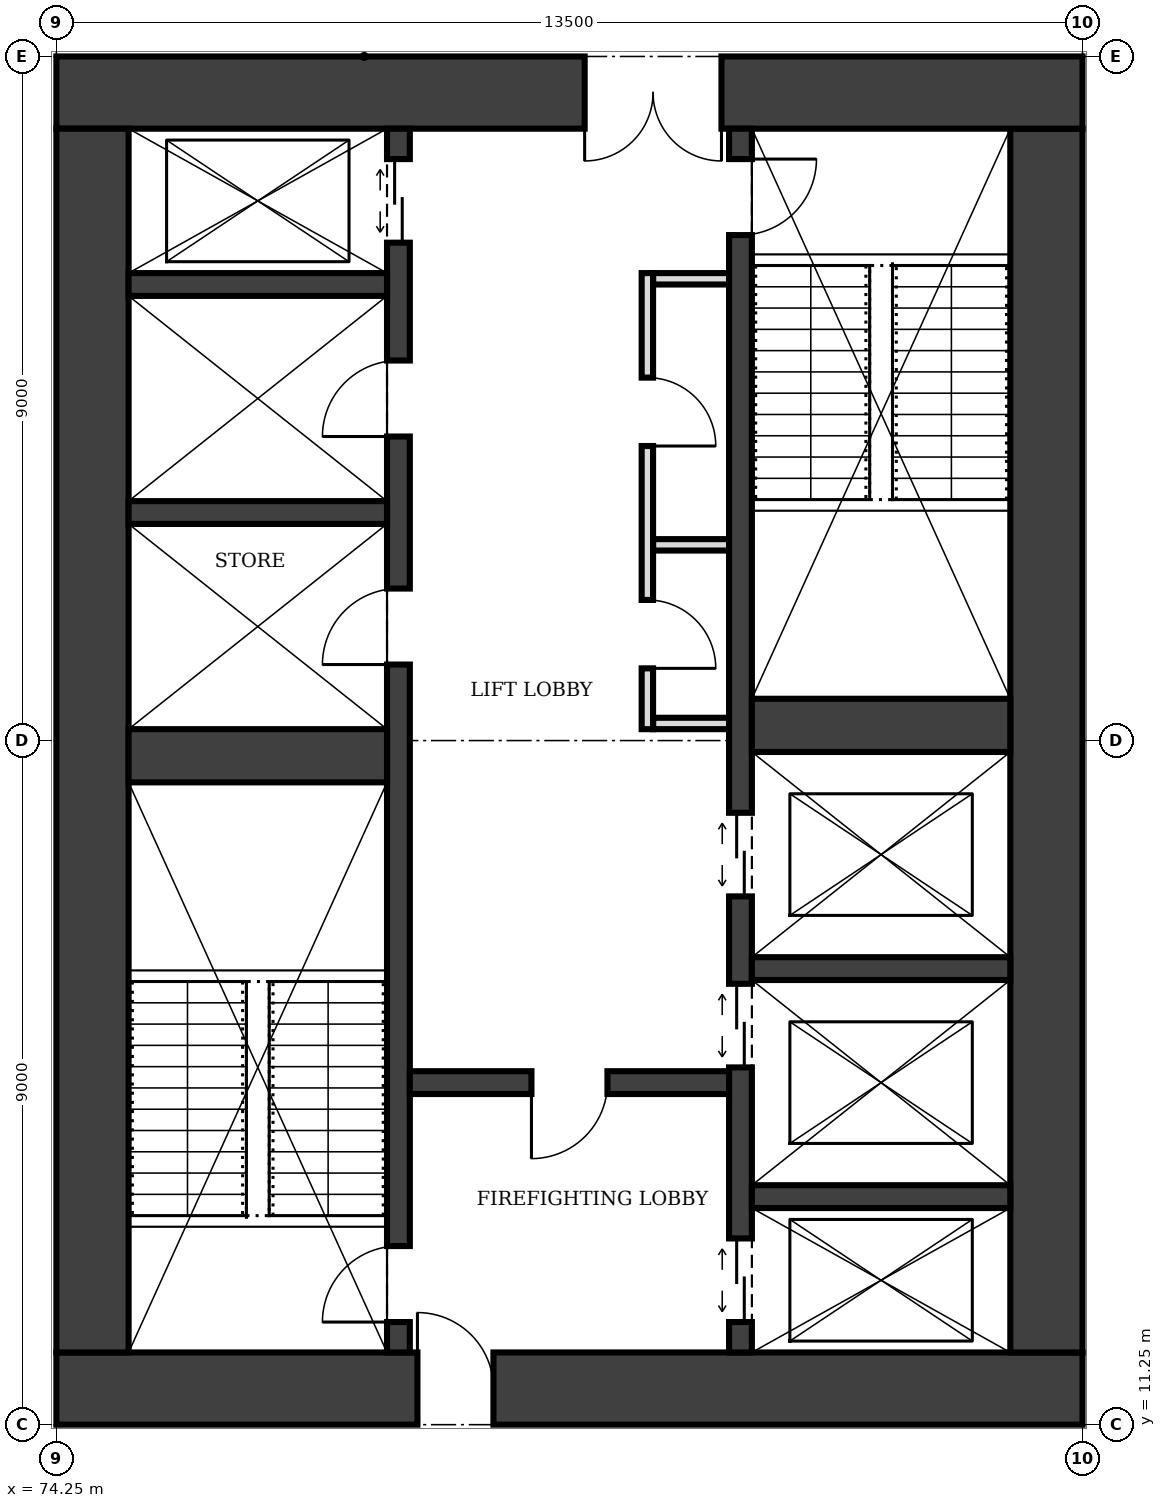
"""IFC4 building model, lengths in metres.
Left out: names, types, materials, properties, quantities, classifications, styles, units other than length and angle.
Written with IfcOpenShell. Run it as: python <this file> out.ifc"""

import sys

from ifc_helpers import new_model, si_unit, direction, frame, frame_2d, origin, place, context, subcontext, project, spatial, rectangle, extrude, element, fill, save


model = new_model("IFC4")
c1 = context("Model", 3, precision=1e-05, world=origin(), true_north=direction((0.0, 1.0)))
c2 = subcontext(c1, "Body", "Model", "MODEL_VIEW")
j1 = project(units=[si_unit("LENGTHUNIT", "METRE"), si_unit("PLANEANGLEUNIT", "RADIAN")], contexts=[c1])
p1 = place(None, origin())
s1 = spatial("IfcSite", under=j1, at=p1, CompositionType="ELEMENT")
p2 = place(p1, origin())
s2 = spatial("IfcBuilding", under=s1, at=p2, CompositionType="ELEMENT")
p3 = place(p2, frame((0.0, 0.0, 185.0)))
s3 = spatial("IfcBuildingStorey", under=s2, at=p3, CompositionType="ELEMENT", Elevation=185.0)
p4 = place(p3, frame((74.25, 11.725, 0.0), z_axis=(0.0, 0.0, 1.0), x_axis=(1.0, 0.0, 0.0)))
e1 = element("IfcWall", 1, at=p4, inside=s3, PredefinedType="SHEAR", context=c2, shape_type="SweptSolid", body=[
    extrude(rectangle(XDim=13.5, YDim=0.95, at=frame_2d((6.75, 0.0))), origin(), (0.0, 0.0, 1.0), 4.0),
])
p5 = place(p4, frame((4.75, 0.0, 0.0)))
e2 = element("IfcOpeningElement", 2, at=p5, cuts=e1, PredefinedType="OPENING", context=c2, shape_type="SweptSolid", body=[
    extrude(rectangle(XDim=1.0, YDim=2.1, at=frame_2d((0.5, 1.05))), frame((0.0, 0.485, 0.0), z_axis=(0.0, -1.0, 0.0), x_axis=(1.0, 0.0, 0.0)), (0.0, 0.0, 1.0), 0.97),
])
p6 = place(p3, frame((87.275, 12.2, 0.0), z_axis=(0.0, 0.0, 1.0), x_axis=(0.0, 1.0, 0.0)))
e3 = element("IfcWall", 3, at=p6, inside=s3, PredefinedType="SHEAR", context=c2, shape_type="SweptSolid", body=[
    extrude(rectangle(XDim=16.1, YDim=0.95, at=frame_2d((8.05, 0.0))), origin(), (0.0, 0.0, 1.0), 4.0),
])
p7 = place(p3, frame((87.75, 28.775, 0.0), z_axis=(0.0, 0.0, 1.0), x_axis=(-1.0, 0.0, 0.0)))
e4 = element("IfcWall", 4, at=p7, inside=s3, PredefinedType="SHEAR", context=c2, shape_type="SweptSolid", body=[
    extrude(rectangle(XDim=13.5, YDim=0.95, at=frame_2d((6.75, 0.0))), origin(), (0.0, 0.0, 1.0), 4.0),
])
p8 = place(p7, frame((4.75, 0.0, 0.0)))
e5 = element("IfcOpeningElement", 5, at=p8, cuts=e4, PredefinedType="OPENING", context=c2, shape_type="SweptSolid", body=[
    extrude(rectangle(XDim=1.8, YDim=2.1, at=frame_2d((0.9, 1.05))), frame((0.0, 0.485, 0.0), z_axis=(0.0, -1.0, 0.0), x_axis=(1.0, 0.0, 0.0)), (0.0, 0.0, 1.0), 0.97),
])
p9 = place(p3, frame((74.725, 28.3, 0.0), z_axis=(0.0, 0.0, 1.0), x_axis=(0.0, -1.0, 0.0)))
e6 = element("IfcWall", 6, at=p9, inside=s3, PredefinedType="SHEAR", context=c2, shape_type="SweptSolid", body=[
    extrude(rectangle(XDim=16.1, YDim=0.95, at=frame_2d((8.05, 0.0))), origin(), (0.0, 0.0, 1.0), 4.0),
])
p10 = place(p3, frame((78.75, 12.2, 0.0), z_axis=(0.0, 0.0, 1.0), x_axis=(0.0, 1.0, 0.0)))
e7 = element("IfcWall", 7, at=p10, inside=s3, PredefinedType="SHEAR", context=c2, shape_type="SweptSolid", body=[
    extrude(rectangle(XDim=16.1, YDim=0.3, at=frame_2d((8.05, 0.0))), origin(), (0.0, 0.0, 1.0), 4.0),
])
p11 = place(p10, frame((0.4, 0.0, 0.0)))
e8 = element("IfcOpeningElement", 8, at=p11, cuts=e7, PredefinedType="OPENING", context=c2, shape_type="SweptSolid", body=[
    extrude(rectangle(XDim=1.0, YDim=2.1, at=frame_2d((0.5, 1.05))), frame((0.0, 0.16, 0.0), z_axis=(0.0, -1.0, 0.0), x_axis=(1.0, 0.0, 0.0)), (0.0, 0.0, 1.0), 0.32),
])
p12 = place(p10, frame((14.6, 0.0, 0.0)))
e9 = element("IfcOpeningElement", 9, at=p12, cuts=e7, PredefinedType="OPENING", context=c2, shape_type="SweptSolid", body=[
    extrude(rectangle(XDim=1.1, YDim=2.1, at=frame_2d((0.55, 1.05))), frame((0.0, 0.16, 0.0), z_axis=(0.0, -1.0, 0.0), x_axis=(1.0, 0.0, 0.0)), (0.0, 0.0, 1.0), 0.32),
])
p13 = place(p10, frame((9.05, 0.0, 0.0)))
e10 = element("IfcOpeningElement", 10, at=p13, cuts=e7, PredefinedType="OPENING", context=c2, shape_type="SweptSolid", body=[
    extrude(rectangle(XDim=1.0, YDim=2.1, at=frame_2d((0.5, 1.05))), frame((0.0, 0.16, 0.0), z_axis=(0.0, -1.0, 0.0), x_axis=(1.0, 0.0, 0.0)), (0.0, 0.0, 1.0), 0.32),
])
p14 = place(p10, frame((12.05, 0.0, 0.0)))
e11 = element("IfcOpeningElement", 11, at=p14, cuts=e7, PredefinedType="OPENING", context=c2, shape_type="SweptSolid", body=[
    extrude(rectangle(XDim=1.0, YDim=2.1, at=frame_2d((0.5, 1.05))), frame((0.0, 0.16, 0.0), z_axis=(0.0, -1.0, 0.0), x_axis=(1.0, 0.0, 0.0)), (0.0, 0.0, 1.0), 0.32),
])
p15 = place(p3, frame((83.25, 12.2, 0.0), z_axis=(0.0, 0.0, 1.0), x_axis=(0.0, 1.0, 0.0)))
e12 = element("IfcWall", 12, at=p15, inside=s3, PredefinedType="SHEAR", context=c2, shape_type="SweptSolid", body=[
    extrude(rectangle(XDim=16.1, YDim=0.3, at=frame_2d((8.05, 0.0))), origin(), (0.0, 0.0, 1.0), 4.0),
])
p16 = place(p15, frame((14.7, 0.0, 0.0)))
e13 = element("IfcOpeningElement", 13, at=p16, cuts=e12, PredefinedType="OPENING", context=c2, shape_type="SweptSolid", body=[
    extrude(rectangle(XDim=1.0, YDim=2.1, at=frame_2d((0.5, 1.05))), frame((0.0, 0.16, 0.0), z_axis=(0.0, -1.0, 0.0), x_axis=(1.0, 0.0, 0.0)), (0.0, 0.0, 1.0), 0.32),
])
p17 = place(p15, frame((0.4, 0.0, 0.0)))
e14 = element("IfcOpeningElement", 14, at=p17, cuts=e12, PredefinedType="OPENING", context=c2, shape_type="SweptSolid", body=[
    extrude(rectangle(XDim=1.1, YDim=2.1, at=frame_2d((0.55, 1.05))), frame((0.0, 0.16, 0.0), z_axis=(0.0, -1.0, 0.0), x_axis=(1.0, 0.0, 0.0)), (0.0, 0.0, 1.0), 0.32),
])
p18 = place(p15, frame((3.75, 0.0, 0.0)))
e15 = element("IfcOpeningElement", 15, at=p18, cuts=e12, PredefinedType="OPENING", context=c2, shape_type="SweptSolid", body=[
    extrude(rectangle(XDim=1.1, YDim=2.1, at=frame_2d((0.55, 1.05))), frame((0.0, 0.16, 0.0), z_axis=(0.0, -1.0, 0.0), x_axis=(1.0, 0.0, 0.0)), (0.0, 0.0, 1.0), 0.32),
])
p19 = place(p15, frame((6.0, 0.0, 0.0)))
e16 = element("IfcOpeningElement", 16, at=p19, cuts=e12, PredefinedType="OPENING", context=c2, shape_type="SweptSolid", body=[
    extrude(rectangle(XDim=1.1, YDim=2.1, at=frame_2d((0.55, 1.05))), frame((0.0, 0.16, 0.0), z_axis=(0.0, -1.0, 0.0), x_axis=(1.0, 0.0, 0.0)), (0.0, 0.0, 1.0), 0.32),
])
p20 = place(p3, frame((75.2, 20.05, 0.0), z_axis=(0.0, 0.0, 1.0), x_axis=(1.0, 0.0, 0.0)))
e17 = element("IfcWall", 17, at=p20, inside=s3, PredefinedType="SHEAR", context=c2, shape_type="SweptSolid", body=[
    extrude(rectangle(XDim=3.4, YDim=0.7, at=frame_2d((1.7, 0.0))), origin(), (0.0, 0.0, 1.0), 4.0),
])
p21 = place(p3, frame((78.9, 15.75, 0.0), z_axis=(0.0, 0.0, 1.0), x_axis=(1.0, 0.0, 0.0)))
e18 = element("IfcWall", 18, at=p21, inside=s3, PredefinedType="SHEAR", context=c2, shape_type="SweptSolid", body=[
    extrude(rectangle(XDim=4.2, YDim=0.3, at=frame_2d((2.1, 0.0))), origin(), (0.0, 0.0, 1.0), 4.0),
])
p22 = place(p21, frame((1.6, 0.0, 0.0)))
e19 = element("IfcOpeningElement", 19, at=p22, cuts=e18, PredefinedType="OPENING", context=c2, shape_type="SweptSolid", body=[
    extrude(rectangle(XDim=1.0, YDim=2.1, at=frame_2d((0.5, 1.05))), frame((0.0, 0.16, 0.0), z_axis=(0.0, -1.0, 0.0), x_axis=(1.0, 0.0, 0.0)), (0.0, 0.0, 1.0), 0.32),
])
for number, where, z_axis, x_axis in (
    (20, (83.4, 14.25, 0.0), (0.0, 0.0, 1.0), (1.0, 0.0, 0.0)),
    (21, (83.4, 17.25, 0.0), (0.0, 0.0, 1.0), (1.0, 0.0, 0.0)),
):
    element("IfcWall", number, at=place(p3, frame(where, z_axis=z_axis, x_axis=x_axis)), inside=s3, PredefinedType="SHEAR", context=c2, shape_type="SweptSolid", body=[
        extrude(rectangle(XDim=3.4, YDim=0.3, at=frame_2d((1.7, 0.0))), origin(), (0.0, 0.0, 1.0), 4.0),
    ])
p23 = place(p3, frame((83.4, 20.45, 0.0), z_axis=(0.0, 0.0, 1.0), x_axis=(1.0, 0.0, 0.0)))
e22 = element("IfcWall", 22, at=p23, inside=s3, PredefinedType="SHEAR", context=c2, shape_type="SweptSolid", body=[
    extrude(rectangle(XDim=3.4, YDim=0.7, at=frame_2d((1.7, 0.0))), origin(), (0.0, 0.0, 1.0), 4.0),
])
for number, where, z_axis, x_axis in (
    (23, (75.2, 23.25, 0.0), (0.0, 0.0, 1.0), (1.0, 0.0, 0.0)),
    (24, (75.2, 26.25, 0.0), (0.0, 0.0, 1.0), (1.0, 0.0, 0.0)),
):
    element("IfcWall", number, at=place(p3, frame(where, z_axis=z_axis, x_axis=x_axis)), inside=s3, PredefinedType="SHEAR", context=c2, shape_type="SweptSolid", body=[
        extrude(rectangle(XDim=3.4, YDim=0.3, at=frame_2d((1.7, 0.0))), origin(), (0.0, 0.0, 1.0), 4.0),
    ])
p24 = place(p3, frame((82.025, 20.4, 0.0), z_axis=(0.0, 0.0, 1.0), x_axis=(0.0, 1.0, 0.0)))
e25 = element("IfcWall", 25, at=p24, inside=s3, PredefinedType="PARTITIONING", context=c2, shape_type="SweptSolid", body=[
    extrude(rectangle(XDim=6.0, YDim=0.15, at=frame_2d((3.0, 0.0))), origin(), (0.0, 0.0, 1.0), 3.75),
])
p25 = place(p24, frame((0.8, 0.0, 0.0)))
e26 = element("IfcOpeningElement", 26, at=p25, cuts=e25, PredefinedType="OPENING", context=c2, shape_type="SweptSolid", body=[
    extrude(rectangle(XDim=0.9, YDim=2.1, at=frame_2d((0.45, 1.05))), frame((0.0, 0.085, 0.0), z_axis=(0.0, -1.0, 0.0), x_axis=(1.0, 0.0, 0.0)), (0.0, 0.0, 1.0), 0.17),
])
p26 = place(p24, frame((3.725, 0.0, 0.0)))
e27 = element("IfcOpeningElement", 27, at=p26, cuts=e25, PredefinedType="OPENING", context=c2, shape_type="SweptSolid", body=[
    extrude(rectangle(XDim=0.9, YDim=2.1, at=frame_2d((0.45, 1.05))), frame((0.0, 0.085, 0.0), z_axis=(0.0, -1.0, 0.0), x_axis=(1.0, 0.0, 0.0)), (0.0, 0.0, 1.0), 0.17),
])
for number, where, z_axis, x_axis in (
    (28, (82.1, 20.475, 0.0), (0.0, 0.0, 1.0), (1.0, 0.0, 0.0)),
    (29, (82.1, 22.825, 0.0), (0.0, 0.0, 1.0), (1.0, 0.0, 0.0)),
    (30, (82.1, 26.325, 0.0), (0.0, 0.0, 1.0), (1.0, 0.0, 0.0)),
):
    element("IfcWall", number, at=place(p3, frame(where, z_axis=z_axis, x_axis=x_axis)), inside=s3, PredefinedType="PARTITIONING", context=c2, shape_type="SweptSolid", body=[
        extrude(rectangle(XDim=1.0, YDim=0.15, at=frame_2d((0.5, 0.0))), origin(), (0.0, 0.0, 1.0), 3.75),
    ])
p27 = place(p5, origin())
e31 = element("IfcDoor", 31, at=p27, inside=s3, OperationType="SINGLE_SWING_LEFT", PredefinedType="DOOR", context=c2, shape_type="SweptSolid", body=[
    extrude(rectangle(XDim=1.0, YDim=2.1, at=frame_2d((0.5, 1.05))), frame((0.0, 0.025, 0.0), z_axis=(0.0, -1.0, 0.0), x_axis=(1.0, 0.0, 0.0)), (0.0, 0.0, 1.0), 0.05),
])
fill(e2, e31)
p28 = place(p8, origin())
e32 = element("IfcDoor", 32, at=p28, inside=s3, OperationType="DOUBLE_DOOR_SINGLE_SWING", PredefinedType="DOOR", context=c2, shape_type="SweptSolid", body=[
    extrude(rectangle(XDim=1.8, YDim=2.1, at=frame_2d((0.9, 1.05))), frame((0.0, 0.025, 0.0), z_axis=(0.0, -1.0, 0.0), x_axis=(1.0, 0.0, 0.0)), (0.0, 0.0, 1.0), 0.05),
])
fill(e5, e32)
p29 = place(p22, frame((1.0, 0.0, 0.0), z_axis=(0.0, 0.0, 1.0), x_axis=(-1.0, 0.0, 0.0)))
e33 = element("IfcDoor", 33, at=p29, inside=s3, OperationType="SINGLE_SWING_RIGHT", PredefinedType="DOOR", context=c2, shape_type="SweptSolid", body=[
    extrude(rectangle(XDim=1.0, YDim=2.1, at=frame_2d((0.5, 1.05))), frame((0.0, 0.025, 0.0), z_axis=(0.0, -1.0, 0.0), x_axis=(1.0, 0.0, 0.0)), (0.0, 0.0, 1.0), 0.05),
])
fill(e19, e33)
p30 = place(p11, origin())
e34 = element("IfcDoor", 34, at=p30, inside=s3, OperationType="SINGLE_SWING_LEFT", PredefinedType="DOOR", context=c2, shape_type="SweptSolid", body=[
    extrude(rectangle(XDim=1.0, YDim=2.1, at=frame_2d((0.5, 1.05))), frame((0.0, 0.025, 0.0), z_axis=(0.0, -1.0, 0.0), x_axis=(1.0, 0.0, 0.0)), (0.0, 0.0, 1.0), 0.05),
])
fill(e8, e34)
p31 = place(p16, frame((1.0, 0.0, 0.0), z_axis=(0.0, 0.0, 1.0), x_axis=(-1.0, 0.0, 0.0)))
e35 = element("IfcDoor", 35, at=p31, inside=s3, OperationType="SINGLE_SWING_LEFT", PredefinedType="DOOR", context=c2, shape_type="SweptSolid", body=[
    extrude(rectangle(XDim=1.0, YDim=2.1, at=frame_2d((0.5, 1.05))), frame((0.0, 0.025, 0.0), z_axis=(0.0, -1.0, 0.0), x_axis=(1.0, 0.0, 0.0)), (0.0, 0.0, 1.0), 0.05),
])
fill(e13, e35)
p32 = place(p17, origin())
e36 = element("IfcDoor", 36, at=p32, inside=s3, OperationType="DOUBLE_DOOR_SLIDING", PredefinedType="DOOR", context=c2, shape_type="SweptSolid", body=[
    extrude(rectangle(XDim=1.1, YDim=2.1, at=frame_2d((0.55, 1.05))), frame((0.0, 0.025, 0.0), z_axis=(0.0, -1.0, 0.0), x_axis=(1.0, 0.0, 0.0)), (0.0, 0.0, 1.0), 0.05),
])
fill(e14, e36)
p33 = place(p12, origin())
e37 = element("IfcDoor", 37, at=p33, inside=s3, OperationType="DOUBLE_DOOR_SLIDING", PredefinedType="DOOR", context=c2, shape_type="SweptSolid", body=[
    extrude(rectangle(XDim=1.1, YDim=2.1, at=frame_2d((0.55, 1.05))), frame((0.0, 0.025, 0.0), z_axis=(0.0, -1.0, 0.0), x_axis=(1.0, 0.0, 0.0)), (0.0, 0.0, 1.0), 0.05),
])
fill(e9, e37)
p34 = place(p18, origin())
e38 = element("IfcDoor", 38, at=p34, inside=s3, OperationType="DOUBLE_DOOR_SLIDING", PredefinedType="DOOR", context=c2, shape_type="SweptSolid", body=[
    extrude(rectangle(XDim=1.1, YDim=2.1, at=frame_2d((0.55, 1.05))), frame((0.0, 0.025, 0.0), z_axis=(0.0, -1.0, 0.0), x_axis=(1.0, 0.0, 0.0)), (0.0, 0.0, 1.0), 0.05),
])
fill(e15, e38)
p35 = place(p19, origin())
e39 = element("IfcDoor", 39, at=p35, inside=s3, OperationType="DOUBLE_DOOR_SLIDING", PredefinedType="DOOR", context=c2, shape_type="SweptSolid", body=[
    extrude(rectangle(XDim=1.1, YDim=2.1, at=frame_2d((0.55, 1.05))), frame((0.0, 0.025, 0.0), z_axis=(0.0, -1.0, 0.0), x_axis=(1.0, 0.0, 0.0)), (0.0, 0.0, 1.0), 0.05),
])
fill(e16, e39)
p36 = place(p25, frame((0.9, 0.0, 0.0), z_axis=(0.0, 0.0, 1.0), x_axis=(-1.0, 0.0, 0.0)))
e40 = element("IfcDoor", 40, at=p36, inside=s3, OperationType="SINGLE_SWING_RIGHT", PredefinedType="DOOR", context=c2, shape_type="SweptSolid", body=[
    extrude(rectangle(XDim=0.9, YDim=2.1, at=frame_2d((0.45, 1.05))), frame((0.0, 0.025, 0.0), z_axis=(0.0, -1.0, 0.0), x_axis=(1.0, 0.0, 0.0)), (0.0, 0.0, 1.0), 0.05),
])
fill(e26, e40)
p37 = place(p26, frame((0.9, 0.0, 0.0), z_axis=(0.0, 0.0, 1.0), x_axis=(-1.0, 0.0, 0.0)))
e41 = element("IfcDoor", 41, at=p37, inside=s3, OperationType="SINGLE_SWING_RIGHT", PredefinedType="DOOR", context=c2, shape_type="SweptSolid", body=[
    extrude(rectangle(XDim=0.9, YDim=2.1, at=frame_2d((0.45, 1.05))), frame((0.0, 0.025, 0.0), z_axis=(0.0, -1.0, 0.0), x_axis=(1.0, 0.0, 0.0)), (0.0, 0.0, 1.0), 0.05),
])
fill(e27, e41)
p38 = place(p13, origin())
e42 = element("IfcDoor", 42, at=p38, inside=s3, OperationType="SINGLE_SWING_LEFT", PredefinedType="DOOR", context=c2, shape_type="SweptSolid", body=[
    extrude(rectangle(XDim=1.0, YDim=2.1, at=frame_2d((0.5, 1.05))), frame((0.0, 0.025, 0.0), z_axis=(0.0, -1.0, 0.0), x_axis=(1.0, 0.0, 0.0)), (0.0, 0.0, 1.0), 0.05),
])
fill(e10, e42)
p39 = place(p14, origin())
e43 = element("IfcDoor", 43, at=p39, inside=s3, OperationType="SINGLE_SWING_LEFT", PredefinedType="DOOR", context=c2, shape_type="SweptSolid", body=[
    extrude(rectangle(XDim=1.0, YDim=2.1, at=frame_2d((0.5, 1.05))), frame((0.0, 0.025, 0.0), z_axis=(0.0, -1.0, 0.0), x_axis=(1.0, 0.0, 0.0)), (0.0, 0.0, 1.0), 0.05),
])
fill(e11, e43)
save(model, sys.argv[1])
